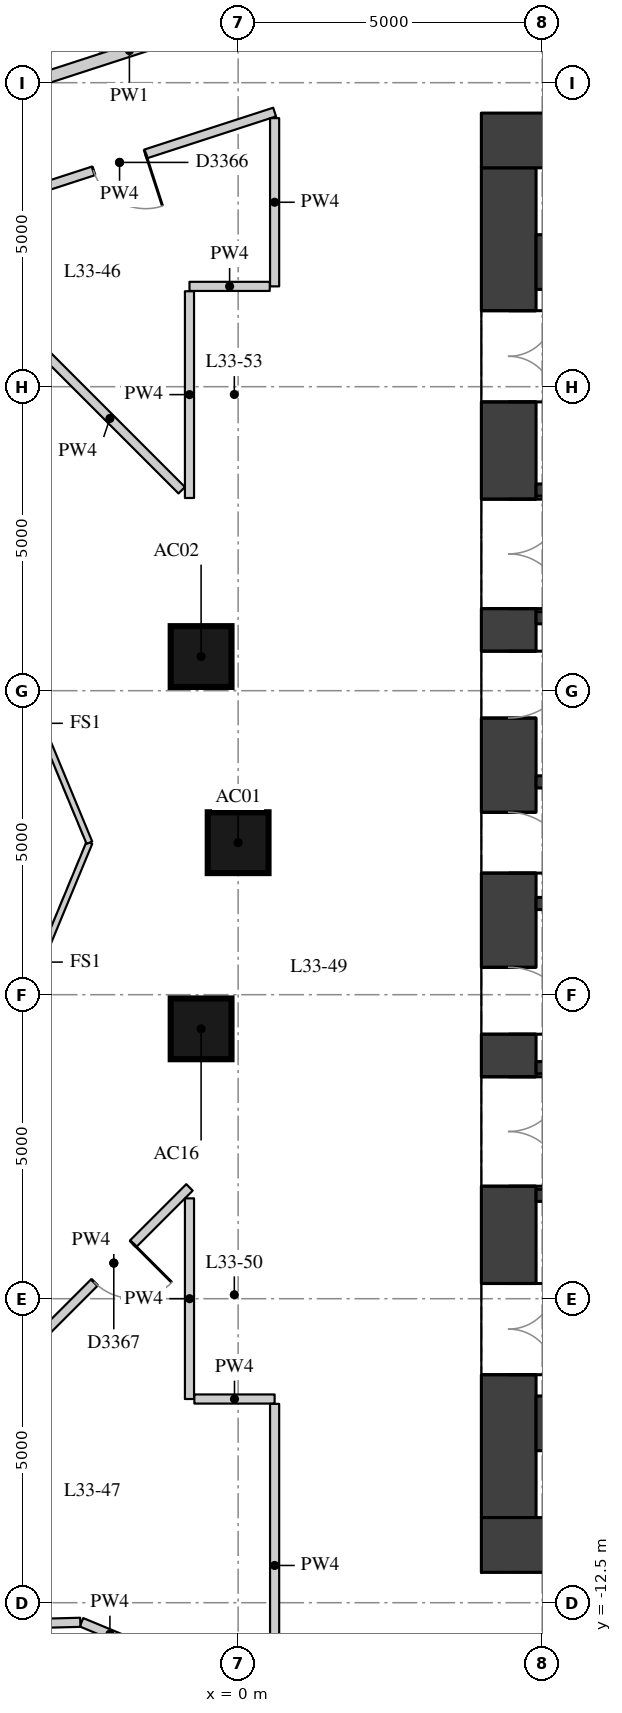
"""IFC4 building model, lengths in metres.
Left out: names, types, materials, properties, quantities, classifications, styles, units other than length and angle.
Written with IfcOpenShell. Run it as: python <this file> out.ifc"""

import sys

from ifc_helpers import new_model, si_unit, direction, frame, frame_2d, origin, origin_2d, place, context, subcontext, project, spatial, rectangle, extrude, element, fill, save


model = new_model("IFC4")
c1 = context("Model", 3, precision=1e-05, world=origin(), true_north=direction((0.0, 1.0)))
c2 = subcontext(c1, "Body", "Model", "MODEL_VIEW")
j1 = project(units=[si_unit("LENGTHUNIT", "METRE"), si_unit("PLANEANGLEUNIT", "RADIAN")], contexts=[c1])
p1 = place(None, origin())
s1 = spatial("IfcSite", under=j1, at=p1, CompositionType="ELEMENT")
p2 = place(p1, origin())
s2 = spatial("IfcBuilding", under=s1, at=p2, CompositionType="ELEMENT")
p3 = place(p2, frame((0.0, 0.0, 118.6)))
s3 = spatial("IfcBuildingStorey", under=s2, at=p3, CompositionType="ELEMENT", Elevation=118.6)
for number, where, z_axis, x_axis in (
    (1, (0.0, 0.0, 0.0), (0.0, 0.0, 1.0), (1.0, 0.0, 0.0)),
    (2, (-0.609, 3.062, 0.0), (0.0, 0.0, 1.0), (1.0, 0.0, 0.0)),
    (3, (-0.609, -3.062, 0.0), (0.0, 0.0, 1.0), (1.0, 0.0, 0.0)),
):
    element("IfcColumn", number, at=place(p3, frame(where, z_axis=z_axis, x_axis=x_axis)), inside=s3, PredefinedType="COLUMN", context=c2, shape_type="SweptSolid", body=[
        extrude(rectangle(XDim=1.0, YDim=1.0, at=origin_2d()), origin(), (0.0, 0.0, 1.0), 3.3),
    ])
p4 = place(p3, frame((4.45, -11.1, 0.0), z_axis=(0.0, 0.0, 1.0), x_axis=(0.0, 1.0, 0.0)))
e4 = element("IfcWall", 4, at=p4, inside=s3, PredefinedType="SHEAR", context=c2, shape_type="SweptSolid", body=[
    extrude(rectangle(XDim=22.2, YDim=0.9, at=frame_2d((11.1, 0.0))), origin(), (0.0, 0.0, 1.0), 3.02),
])
p5 = place(p4, frame((2.35, 0.0, 0.0)))
e5 = element("IfcOpeningElement", 5, at=p5, cuts=e4, PredefinedType="OPENING", context=c2, shape_type="SweptSolid", body=[
    extrude(rectangle(XDim=1.5, YDim=2.1, at=frame_2d((0.75, 1.05))), frame((0.0, 0.46, 0.0), z_axis=(0.0, -1.0, 0.0), x_axis=(1.0, 0.0, 0.0)), (0.0, 0.0, 1.0), 0.92),
])
p6 = place(p4, frame((5.45, 0.0, 0.0)))
e6 = element("IfcOpeningElement", 6, at=p6, cuts=e4, PredefinedType="OPENING", context=c2, shape_type="SweptSolid", body=[
    extrude(rectangle(XDim=1.8, YDim=2.1, at=frame_2d((0.9, 1.05))), frame((0.0, 0.46, 0.0), z_axis=(0.0, -1.0, 0.0), x_axis=(1.0, 0.0, 0.0)), (0.0, 0.0, 1.0), 0.92),
])
p7 = place(p4, frame((7.95, 0.0, 0.0)))
e7 = element("IfcOpeningElement", 7, at=p7, cuts=e4, PredefinedType="OPENING", context=c2, shape_type="SweptSolid", body=[
    extrude(rectangle(XDim=1.1, YDim=2.1, at=frame_2d((0.55, 1.05))), frame((0.0, 0.46, 0.0), z_axis=(0.0, -1.0, 0.0), x_axis=(1.0, 0.0, 0.0)), (0.0, 0.0, 1.0), 0.92),
])
p8 = place(p4, frame((10.6, 0.0, 0.0)))
e8 = element("IfcOpeningElement", 8, at=p8, cuts=e4, PredefinedType="OPENING", context=c2, shape_type="SweptSolid", body=[
    extrude(rectangle(XDim=1.0, YDim=2.1, at=frame_2d((0.5, 1.05))), frame((0.0, 0.46, 0.0), z_axis=(0.0, -1.0, 0.0), x_axis=(1.0, 0.0, 0.0)), (0.0, 0.0, 1.0), 0.92),
])
p9 = place(p4, frame((13.15, 0.0, 0.0)))
e9 = element("IfcOpeningElement", 9, at=p9, cuts=e4, PredefinedType="OPENING", context=c2, shape_type="SweptSolid", body=[
    extrude(rectangle(XDim=1.1, YDim=2.1, at=frame_2d((0.55, 1.05))), frame((0.0, 0.46, 0.0), z_axis=(0.0, -1.0, 0.0), x_axis=(1.0, 0.0, 0.0)), (0.0, 0.0, 1.0), 0.92),
])
p10 = place(p4, frame((14.95, 0.0, 0.0)))
e10 = element("IfcOpeningElement", 10, at=p10, cuts=e4, PredefinedType="OPENING", context=c2, shape_type="SweptSolid", body=[
    extrude(rectangle(XDim=1.8, YDim=2.1, at=frame_2d((0.9, 1.05))), frame((0.0, 0.46, 0.0), z_axis=(0.0, -1.0, 0.0), x_axis=(1.0, 0.0, 0.0)), (0.0, 0.0, 1.0), 0.92),
])
p11 = place(p4, frame((18.35, 0.0, 0.0)))
e11 = element("IfcOpeningElement", 11, at=p11, cuts=e4, PredefinedType="OPENING", context=c2, shape_type="SweptSolid", body=[
    extrude(rectangle(XDim=1.5, YDim=2.1, at=frame_2d((0.75, 1.05))), frame((0.0, 0.46, 0.0), z_axis=(0.0, -1.0, 0.0), x_axis=(1.0, 0.0, 0.0)), (0.0, 0.0, 1.0), 0.92),
])
for number, where, z_axis, x_axis in (
    (12, (4.0, 11.55, 0.0), (0.0, 0.0, 1.0), (1.0, 0.0, 0.0)),
    (13, (4.0, -11.55, 0.0), (0.0, 0.0, 1.0), (1.0, 0.0, 0.0)),
):
    element("IfcWall", number, at=place(p3, frame(where, z_axis=z_axis, x_axis=x_axis)), inside=s3, PredefinedType="SHEAR", context=c2, shape_type="SweptSolid", body=[
        extrude(rectangle(XDim=15.2, YDim=0.9, at=frame_2d((7.6, 0.0))), origin(), (0.0, 0.0, 1.0), 3.02),
    ])
for number, where, z_axis, x_axis in (
    (14, (4.9, 9.55, 0.0), (0.0, 0.0, 1.0), (1.0, 0.0, 0.0)),
    (15, (4.9, -9.55, 0.0), (0.0, 0.0, 1.0), (1.0, 0.0, 0.0)),
):
    element("IfcWall", number, at=place(p3, frame(where, z_axis=z_axis, x_axis=x_axis)), inside=s3, PredefinedType="SHEAR", context=c2, shape_type="SweptSolid", body=[
        extrude(rectangle(XDim=10.2, YDim=0.9, at=frame_2d((5.1, 0.0))), origin(), (0.0, 0.0, 1.0), 3.02),
    ])
p12 = place(p3, frame((4.9, 5.8, 0.0), z_axis=(0.0, 0.0, 1.0), x_axis=(1.0, 0.0, 0.0)))
e16 = element("IfcWall", 16, at=p12, inside=s3, PredefinedType="SHEAR", context=c2, shape_type="SweptSolid", body=[
    extrude(rectangle(XDim=10.2, YDim=0.2, at=frame_2d((5.1, 0.0))), origin(), (0.0, 0.0, 1.0), 3.02),
])
p13 = place(p12, frame((6.75, 0.0, 0.0)))
e17 = element("IfcOpeningElement", 17, at=p13, cuts=e16, PredefinedType="OPENING", context=c2, shape_type="SweptSolid", body=[
    extrude(rectangle(XDim=1.1, YDim=2.1, at=frame_2d((0.55, 1.05))), frame((0.0, 0.11, 0.0), z_axis=(0.0, -1.0, 0.0), x_axis=(1.0, 0.0, 0.0)), (0.0, 0.0, 1.0), 0.22),
])
p14 = place(p12, frame((8.75, 0.0, 0.0)))
e18 = element("IfcOpeningElement", 18, at=p14, cuts=e16, PredefinedType="OPENING", context=c2, shape_type="SweptSolid", body=[
    extrude(rectangle(XDim=1.1, YDim=2.1, at=frame_2d((0.55, 1.05))), frame((0.0, 0.11, 0.0), z_axis=(0.0, -1.0, 0.0), x_axis=(1.0, 0.0, 0.0)), (0.0, 0.0, 1.0), 0.22),
])
p15 = place(p3, frame((4.9, 3.7, 0.0), z_axis=(0.0, 0.0, 1.0), x_axis=(1.0, 0.0, 0.0)))
e19 = element("IfcWall", 19, at=p15, inside=s3, PredefinedType="SHEAR", context=c2, shape_type="SweptSolid", body=[
    extrude(rectangle(XDim=10.2, YDim=0.2, at=frame_2d((5.1, 0.0))), origin(), (0.0, 0.0, 1.0), 3.02),
])
p16 = place(p15, frame((6.3, 0.0, 0.0)))
e20 = element("IfcOpeningElement", 20, at=p16, cuts=e19, PredefinedType="OPENING", context=c2, shape_type="SweptSolid", body=[
    extrude(rectangle(XDim=1.1, YDim=2.1, at=frame_2d((0.55, 1.05))), frame((0.0, 0.11, 0.0), z_axis=(0.0, -1.0, 0.0), x_axis=(1.0, 0.0, 0.0)), (0.0, 0.0, 1.0), 0.22),
])
p17 = place(p15, frame((8.6, 0.0, 0.0)))
e21 = element("IfcOpeningElement", 21, at=p17, cuts=e19, PredefinedType="OPENING", context=c2, shape_type="SweptSolid", body=[
    extrude(rectangle(XDim=1.1, YDim=2.1, at=frame_2d((0.55, 1.05))), frame((0.0, 0.11, 0.0), z_axis=(0.0, -1.0, 0.0), x_axis=(1.0, 0.0, 0.0)), (0.0, 0.0, 1.0), 0.22),
])
for number, where, z_axis, x_axis in (
    (22, (4.9, 1.0, 0.0), (0.0, 0.0, 1.0), (1.0, 0.0, 0.0)),
    (23, (4.9, -1.0, 0.0), (0.0, 0.0, 1.0), (1.0, 0.0, 0.0)),
):
    element("IfcWall", number, at=place(p3, frame(where, z_axis=z_axis, x_axis=x_axis)), inside=s3, PredefinedType="SHEAR", context=c2, shape_type="SweptSolid", body=[
        extrude(rectangle(XDim=10.2, YDim=0.2, at=frame_2d((5.1, 0.0))), origin(), (0.0, 0.0, 1.0), 3.02),
    ])
p18 = place(p3, frame((4.9, -3.7, 0.0), z_axis=(0.0, 0.0, 1.0), x_axis=(1.0, 0.0, 0.0)))
e24 = element("IfcWall", 24, at=p18, inside=s3, PredefinedType="SHEAR", context=c2, shape_type="SweptSolid", body=[
    extrude(rectangle(XDim=10.2, YDim=0.2, at=frame_2d((5.1, 0.0))), origin(), (0.0, 0.0, 1.0), 3.02),
])
p19 = place(p18, frame((6.3, 0.0, 0.0)))
e25 = element("IfcOpeningElement", 25, at=p19, cuts=e24, PredefinedType="OPENING", context=c2, shape_type="SweptSolid", body=[
    extrude(rectangle(XDim=1.1, YDim=2.1, at=frame_2d((0.55, 1.05))), frame((0.0, 0.11, 0.0), z_axis=(0.0, -1.0, 0.0), x_axis=(1.0, 0.0, 0.0)), (0.0, 0.0, 1.0), 0.22),
])
p20 = place(p18, frame((8.6, 0.0, 0.0)))
e26 = element("IfcOpeningElement", 26, at=p20, cuts=e24, PredefinedType="OPENING", context=c2, shape_type="SweptSolid", body=[
    extrude(rectangle(XDim=1.1, YDim=2.1, at=frame_2d((0.55, 1.05))), frame((0.0, 0.11, 0.0), z_axis=(0.0, -1.0, 0.0), x_axis=(1.0, 0.0, 0.0)), (0.0, 0.0, 1.0), 0.22),
])
p21 = place(p3, frame((4.9, -5.8, 0.0), z_axis=(0.0, 0.0, 1.0), x_axis=(1.0, 0.0, 0.0)))
e27 = element("IfcWall", 27, at=p21, inside=s3, PredefinedType="SHEAR", context=c2, shape_type="SweptSolid", body=[
    extrude(rectangle(XDim=10.2, YDim=0.2, at=frame_2d((5.1, 0.0))), origin(), (0.0, 0.0, 1.0), 3.02),
])
p22 = place(p3, frame((-7.667, 11.119, 0.0), z_axis=(0.0, 0.0, 1.0), x_axis=(0.951088334028, 0.308919052304, 0.0)))
e28 = element("IfcWall", 28, at=p22, inside=s3, PredefinedType="PARTITIONING", context=c2, shape_type="SweptSolid", body=[
    extrude(rectangle(XDim=12.362, YDim=0.2, at=frame_2d((6.181, 0.0))), origin(), (0.0, 0.0, 1.0), 3.02),
])
p23 = place(p22, frame((7.686, 0.0, 0.0)))
e29 = element("IfcOpeningElement", 29, at=p23, cuts=e28, PredefinedType="OPENING", context=c2, shape_type="SweptSolid", body=[
    extrude(rectangle(XDim=1.1, YDim=2.1, at=frame_2d((0.55, 1.05))), frame((0.0, 0.11, 0.0), z_axis=(0.0, -1.0, 0.0), x_axis=(1.0, 0.0, 0.0)), (0.0, 0.0, 1.0), 0.22),
])
p24 = place(p22, frame((3.88, 0.0, 0.0)))
e30 = element("IfcOpeningElement", 30, at=p24, cuts=e28, PredefinedType="OPENING", context=c2, shape_type="SweptSolid", body=[
    extrude(rectangle(XDim=0.9, YDim=2.1, at=frame_2d((0.45, 1.05))), frame((0.0, 0.11, 0.0), z_axis=(0.0, -1.0, 0.0), x_axis=(1.0, 0.0, 0.0)), (0.0, 0.0, 1.0), 0.22),
])
p25 = place(p3, frame((-4.5, 10.361, 0.0), z_axis=(0.0, 0.0, 1.0), x_axis=(0.951090931116, 0.308911056372, 0.0)))
e31 = element("IfcWall", 31, at=p25, inside=s3, PredefinedType="PARTITIONING", context=c2, shape_type="SweptSolid", body=[
    extrude(rectangle(XDim=5.362, YDim=0.15, at=frame_2d((2.681, 0.0))), origin(), (0.0, 0.0, 1.0), 3.02),
])
p26 = place(p25, frame((2.231, 0.0, 0.0)))
e32 = element("IfcOpeningElement", 32, at=p26, cuts=e31, PredefinedType="OPENING", context=c2, shape_type="SweptSolid", body=[
    extrude(rectangle(XDim=0.9, YDim=2.1, at=frame_2d((0.45, 1.05))), frame((0.0, 0.085, 0.0), z_axis=(0.0, -1.0, 0.0), x_axis=(1.0, 0.0, 0.0)), (0.0, 0.0, 1.0), 0.17),
])
p27 = place(p3, frame((0.6, 11.917, 0.0), z_axis=(0.0, 0.0, 1.0), x_axis=(0.0, -1.0, 0.0)))
e33 = element("IfcWall", 33, at=p27, inside=s3, PredefinedType="PARTITIONING", context=c2, shape_type="SweptSolid", body=[
    extrude(rectangle(XDim=2.767, YDim=0.15, at=frame_2d((1.384, 0.0))), origin(), (0.0, 0.0, 1.0), 3.02),
])
p28 = place(p3, frame((0.52, 9.15, 0.0), z_axis=(0.0, 0.0, 1.0), x_axis=(-1.0, 0.0, 0.0)))
e34 = element("IfcWall", 34, at=p28, inside=s3, PredefinedType="PARTITIONING", context=c2, shape_type="SweptSolid", body=[
    extrude(rectangle(XDim=1.32, YDim=0.15, at=frame_2d((0.66, 0.0))), origin(), (0.0, 0.0, 1.0), 3.02),
])
p29 = place(p3, frame((-0.8, 9.07, 0.0), z_axis=(0.0, 0.0, 1.0), x_axis=(0.0, -1.0, 0.0)))
e35 = element("IfcWall", 35, at=p29, inside=s3, PredefinedType="PARTITIONING", context=c2, shape_type="SweptSolid", body=[
    extrude(rectangle(XDim=3.4, YDim=0.15, at=frame_2d((1.7, 0.0))), origin(), (0.0, 0.0, 1.0), 3.02),
])
p30 = place(p3, frame((-0.927, 5.797, 0.0), z_axis=(0.0, 0.0, 1.0), x_axis=(-0.707106781187, 0.707106781187, 0.0)))
e36 = element("IfcWall", 36, at=p30, inside=s3, PredefinedType="PARTITIONING", context=c2, shape_type="SweptSolid", body=[
    extrude(rectangle(XDim=3.341, YDim=0.15, at=frame_2d((1.67, 0.0))), origin(), (0.0, 0.0, 1.0), 3.02),
])
p31 = place(p3, frame((-3.29, -8.159, 0.0), z_axis=(0.0, 0.0, 1.0), x_axis=(0.707106781187, 0.707106781187, 0.0)))
e37 = element("IfcWall", 37, at=p31, inside=s3, PredefinedType="PARTITIONING", context=c2, shape_type="SweptSolid", body=[
    extrude(rectangle(XDim=3.521, YDim=0.15, at=frame_2d((1.76, 0.0))), origin(), (0.0, 0.0, 1.0), 3.02),
])
p32 = place(p31, frame((1.31, 0.0, 0.0)))
e38 = element("IfcOpeningElement", 38, at=p32, cuts=e37, PredefinedType="OPENING", context=c2, shape_type="SweptSolid", body=[
    extrude(rectangle(XDim=0.9, YDim=2.1, at=frame_2d((0.45, 1.05))), frame((0.0, 0.085, 0.0), z_axis=(0.0, -1.0, 0.0), x_axis=(1.0, 0.0, 0.0)), (0.0, 0.0, 1.0), 0.17),
])
p33 = place(p3, frame((-0.8, -5.85, 0.0), z_axis=(0.0, 0.0, 1.0), x_axis=(0.0, -1.0, 0.0)))
e39 = element("IfcWall", 39, at=p33, inside=s3, PredefinedType="PARTITIONING", context=c2, shape_type="SweptSolid", body=[
    extrude(rectangle(XDim=3.3, YDim=0.15, at=frame_2d((1.65, 0.0))), origin(), (0.0, 0.0, 1.0), 3.02),
])
p34 = place(p3, frame((-0.72, -9.15, 0.0), z_axis=(0.0, 0.0, 1.0), x_axis=(1.0, 0.0, 0.0)))
e40 = element("IfcWall", 40, at=p34, inside=s3, PredefinedType="PARTITIONING", context=c2, shape_type="SweptSolid", body=[
    extrude(rectangle(XDim=1.32, YDim=0.15, at=frame_2d((0.66, 0.0))), origin(), (0.0, 0.0, 1.0), 3.02),
])
p35 = place(p3, frame((0.6, -9.23, 0.0), z_axis=(0.0, 0.0, 1.0), x_axis=(0.0, -1.0, 0.0)))
e41 = element("IfcWall", 41, at=p35, inside=s3, PredefinedType="PARTITIONING", context=c2, shape_type="SweptSolid", body=[
    extrude(rectangle(XDim=5.315, YDim=0.15, at=frame_2d((2.657, 0.0))), origin(), (0.0, 0.0, 1.0), 3.02),
])
p36 = place(p3, frame((-1.641, -13.209, 0.0), z_axis=(0.0, 0.0, 1.0), x_axis=(-0.923725449546, 0.383055209937, 0.0)))
e42 = element("IfcWall", 42, at=p36, inside=s3, PredefinedType="PARTITIONING", context=c2, shape_type="SweptSolid", body=[
    extrude(rectangle(XDim=1.011, YDim=0.15, at=frame_2d((0.506, 0.0))), origin(), (0.0, 0.0, 1.0), 3.02),
])
p37 = place(p3, frame((-2.596, -12.823, 0.0), z_axis=(0.0, 0.0, 1.0), x_axis=(-0.999684436087, -0.025120275573, 0.0)))
e43 = element("IfcWall", 43, at=p37, inside=s3, PredefinedType="PARTITIONING", context=c2, shape_type="SweptSolid", body=[
    extrude(rectangle(XDim=1.905, YDim=0.15, at=frame_2d((0.952, 0.0))), origin(), (0.0, 0.0, 1.0), 3.02),
])
for number, where, z_axis, x_axis in (
    (44, (-2.446, 0.0, 0.0), (0.0, 0.0, 1.0), (-0.383, -0.924, 0.0)),
    (45, (-4.073, 3.927, 0.0), (0.0, 0.0, 1.0), (0.383, -0.924, 0.0)),
):
    element("IfcWall", number, at=place(p3, frame(where, z_axis=z_axis, x_axis=x_axis)), inside=s3, PredefinedType="PARTITIONING", context=c2, shape_type="SweptSolid", body=[
        extrude(rectangle(XDim=4.251, YDim=0.1, at=frame_2d((2.125, 0.0))), origin(), (0.0, 0.0, 1.0), 3.02),
    ])
p38 = place(p5, origin())
e46 = element("IfcDoor", 46, at=p38, inside=s3, OperationType="DOUBLE_DOOR_SINGLE_SWING", PredefinedType="DOOR", context=c2, shape_type="SweptSolid", body=[
    extrude(rectangle(XDim=1.5, YDim=2.1, at=frame_2d((0.75, 1.05))), frame((0.0, 0.025, 0.0), z_axis=(0.0, -1.0, 0.0), x_axis=(1.0, 0.0, 0.0)), (0.0, 0.0, 1.0), 0.05),
])
fill(e5, e46)
p39 = place(p6, origin())
e47 = element("IfcDoor", 47, at=p39, inside=s3, OperationType="DOUBLE_DOOR_SINGLE_SWING", PredefinedType="DOOR", context=c2, shape_type="SweptSolid", body=[
    extrude(rectangle(XDim=1.8, YDim=2.1, at=frame_2d((0.9, 1.05))), frame((0.0, 0.025, 0.0), z_axis=(0.0, -1.0, 0.0), x_axis=(1.0, 0.0, 0.0)), (0.0, 0.0, 1.0), 0.05),
])
fill(e6, e47)
p40 = place(p7, origin())
e48 = element("IfcDoor", 48, at=p40, inside=s3, OperationType="SINGLE_SWING_RIGHT", PredefinedType="DOOR", context=c2, shape_type="SweptSolid", body=[
    extrude(rectangle(XDim=1.1, YDim=2.1, at=frame_2d((0.55, 1.05))), frame((0.0, 0.025, 0.0), z_axis=(0.0, -1.0, 0.0), x_axis=(1.0, 0.0, 0.0)), (0.0, 0.0, 1.0), 0.05),
])
fill(e7, e48)
p41 = place(p8, origin())
e49 = element("IfcDoor", 49, at=p41, inside=s3, OperationType="SINGLE_SWING_RIGHT", PredefinedType="DOOR", context=c2, shape_type="SweptSolid", body=[
    extrude(rectangle(XDim=1.0, YDim=2.1, at=frame_2d((0.5, 1.05))), frame((0.0, 0.025, 0.0), z_axis=(0.0, -1.0, 0.0), x_axis=(1.0, 0.0, 0.0)), (0.0, 0.0, 1.0), 0.05),
])
fill(e8, e49)
p42 = place(p9, origin())
e50 = element("IfcDoor", 50, at=p42, inside=s3, OperationType="SINGLE_SWING_LEFT", PredefinedType="DOOR", context=c2, shape_type="SweptSolid", body=[
    extrude(rectangle(XDim=1.1, YDim=2.1, at=frame_2d((0.55, 1.05))), frame((0.0, 0.025, 0.0), z_axis=(0.0, -1.0, 0.0), x_axis=(1.0, 0.0, 0.0)), (0.0, 0.0, 1.0), 0.05),
])
fill(e9, e50)
p43 = place(p10, origin())
e51 = element("IfcDoor", 51, at=p43, inside=s3, OperationType="DOUBLE_DOOR_SINGLE_SWING", PredefinedType="DOOR", context=c2, shape_type="SweptSolid", body=[
    extrude(rectangle(XDim=1.8, YDim=2.1, at=frame_2d((0.9, 1.05))), frame((0.0, 0.025, 0.0), z_axis=(0.0, -1.0, 0.0), x_axis=(1.0, 0.0, 0.0)), (0.0, 0.0, 1.0), 0.05),
])
fill(e10, e51)
p44 = place(p11, origin())
e52 = element("IfcDoor", 52, at=p44, inside=s3, OperationType="DOUBLE_DOOR_SINGLE_SWING", PredefinedType="DOOR", context=c2, shape_type="SweptSolid", body=[
    extrude(rectangle(XDim=1.5, YDim=2.1, at=frame_2d((0.75, 1.05))), frame((0.0, 0.025, 0.0), z_axis=(0.0, -1.0, 0.0), x_axis=(1.0, 0.0, 0.0)), (0.0, 0.0, 1.0), 0.05),
])
fill(e11, e52)
p45 = place(p26, origin())
e53 = element("IfcDoor", 53, at=p45, inside=s3, OperationType="SINGLE_SWING_LEFT", PredefinedType="DOOR", context=c2, shape_type="SweptSolid", body=[
    extrude(rectangle(XDim=0.9, YDim=2.1, at=frame_2d((0.45, 1.05))), frame((0.0, 0.025, 0.0), z_axis=(0.0, -1.0, 0.0), x_axis=(1.0, 0.0, 0.0)), (0.0, 0.0, 1.0), 0.05),
])
fill(e32, e53)
p46 = place(p32, origin())
e54 = element("IfcDoor", 54, at=p46, inside=s3, OperationType="SINGLE_SWING_LEFT", PredefinedType="DOOR", context=c2, shape_type="SweptSolid", body=[
    extrude(rectangle(XDim=0.9, YDim=2.1, at=frame_2d((0.45, 1.05))), frame((0.0, 0.025, 0.0), z_axis=(0.0, -1.0, 0.0), x_axis=(1.0, 0.0, 0.0)), (0.0, 0.0, 1.0), 0.05),
])
fill(e38, e54)
save(model, sys.argv[1])
